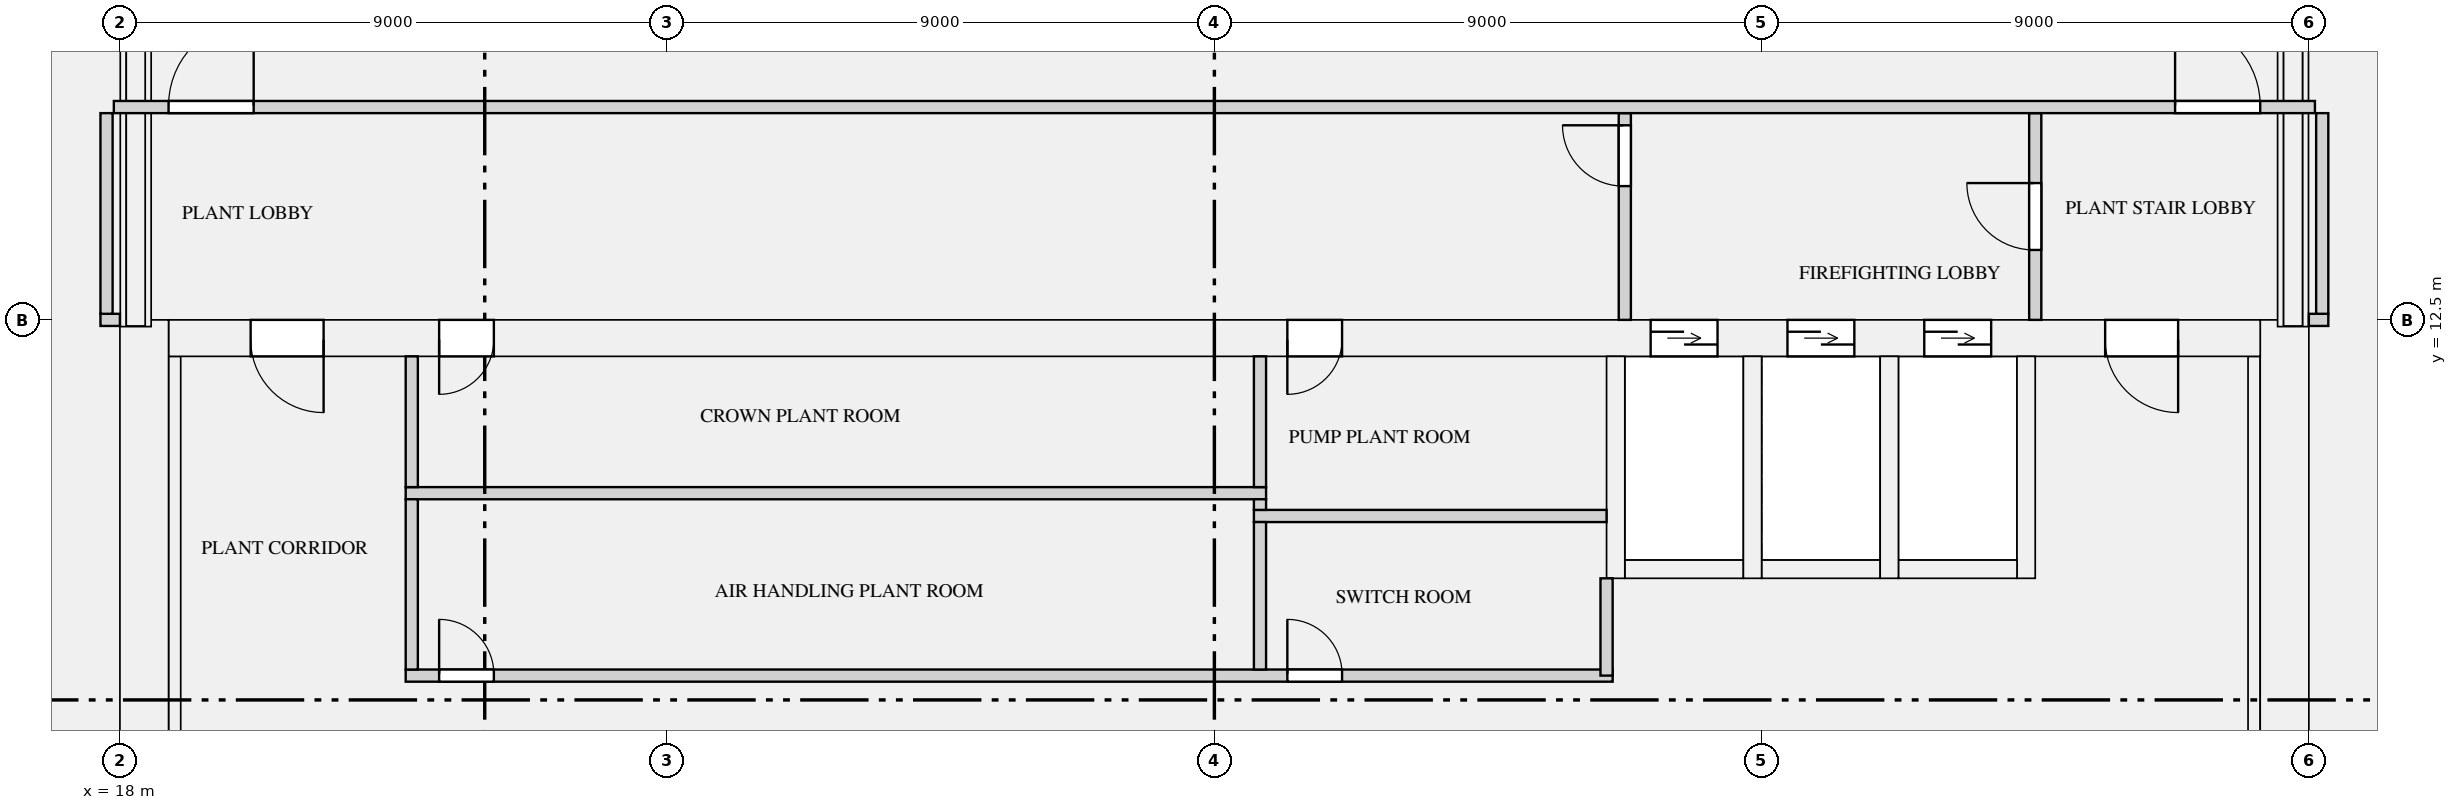
"""IFC4 building model, lengths in metres.
Left out: names, types, materials, properties, quantities, classifications, styles, units other than length and angle.
Written with IfcOpenShell. Run it as: python <this file> out.ifc"""

import sys

from ifc_helpers import new_model, si_unit, direction, frame, frame_2d, origin, place, context, subcontext, project, spatial, rectangle, extrude, element, fill, save


model = new_model("IFC4")
c1 = context("Model", 3, precision=1e-05, world=origin(), true_north=direction((0.0, 1.0)))
c2 = subcontext(c1, "Body", "Model", "MODEL_VIEW")
j1 = project(units=[si_unit("LENGTHUNIT", "METRE"), si_unit("PLANEANGLEUNIT", "RADIAN")], contexts=[c1])
p1 = place(None, origin())
s1 = spatial("IfcSite", under=j1, at=p1, CompositionType="ELEMENT")
p2 = place(p1, origin())
s2 = spatial("IfcBuilding", under=s1, at=p2, CompositionType="ELEMENT")
p3 = place(p2, frame((0.0, 0.0, 130.8)))
s3 = spatial("IfcBuildingStorey", under=s2, at=p3, CompositionType="ELEMENT", Elevation=130.8)
for number, where, z_axis, x_axis in (
    (1, (18.4, 0.0, 0.0), (0.0, 0.0, 1.0), (0.0, 1.0, 0.0)),
    (2, (53.6, 0.0, 0.0), (0.0, 0.0, 1.0), (0.0, 1.0, 0.0)),
):
    element("IfcWall", number, at=place(p3, frame(where, z_axis=z_axis, x_axis=x_axis)), inside=s3, PredefinedType="SHEAR", context=c2, shape_type="SweptSolid", body=[
        extrude(rectangle(XDim=12.5, YDim=0.8, at=frame_2d((6.25, 0.0))), origin(), (0.0, 0.0, 1.0), 6.3),
    ])
p4 = place(p3, frame((18.8, 12.2, 0.0), z_axis=(0.0, 0.0, 1.0), x_axis=(1.0, 0.0, 0.0)))
e3 = element("IfcWall", 3, at=p4, inside=s3, PredefinedType="SHEAR", context=c2, shape_type="SweptSolid", body=[
    extrude(rectangle(XDim=34.4, YDim=0.6, at=frame_2d((17.2, 0.0))), origin(), (0.0, 0.0, 1.0), 6.3),
])
p5 = place(p4, frame((24.375, 0.0, 0.0)))
e4 = element("IfcOpeningElement", 4, at=p5, cuts=e3, PredefinedType="OPENING", context=c2, shape_type="SweptSolid", body=[
    extrude(rectangle(XDim=1.1, YDim=2.1, at=frame_2d((0.55, 1.05))), frame((0.0, 0.31, 0.0), z_axis=(0.0, -1.0, 0.0), x_axis=(1.0, 0.0, 0.0)), (0.0, 0.0, 1.0), 0.62),
])
p6 = place(p4, frame((26.625, 0.0, 0.0)))
e5 = element("IfcOpeningElement", 5, at=p6, cuts=e3, PredefinedType="OPENING", context=c2, shape_type="SweptSolid", body=[
    extrude(rectangle(XDim=1.1, YDim=2.1, at=frame_2d((0.55, 1.05))), frame((0.0, 0.31, 0.0), z_axis=(0.0, -1.0, 0.0), x_axis=(1.0, 0.0, 0.0)), (0.0, 0.0, 1.0), 0.62),
])
p7 = place(p4, frame((28.875, 0.0, 0.0)))
e6 = element("IfcOpeningElement", 6, at=p7, cuts=e3, PredefinedType="OPENING", context=c2, shape_type="SweptSolid", body=[
    extrude(rectangle(XDim=1.1, YDim=2.1, at=frame_2d((0.55, 1.05))), frame((0.0, 0.31, 0.0), z_axis=(0.0, -1.0, 0.0), x_axis=(1.0, 0.0, 0.0)), (0.0, 0.0, 1.0), 0.62),
])
p8 = place(p4, frame((18.4, 0.0, 0.0)))
e7 = element("IfcOpeningElement", 7, at=p8, cuts=e3, PredefinedType="OPENING", context=c2, shape_type="SweptSolid", body=[
    extrude(rectangle(XDim=0.9, YDim=2.1, at=frame_2d((0.45, 1.05))), frame((0.0, 0.31, 0.0), z_axis=(0.0, -1.0, 0.0), x_axis=(1.0, 0.0, 0.0)), (0.0, 0.0, 1.0), 0.62),
])
p9 = place(p4, frame((4.45, 0.0, 0.0)))
e8 = element("IfcOpeningElement", 8, at=p9, cuts=e3, PredefinedType="OPENING", context=c2, shape_type="SweptSolid", body=[
    extrude(rectangle(XDim=0.9, YDim=2.1, at=frame_2d((0.45, 1.05))), frame((0.0, 0.31, 0.0), z_axis=(0.0, -1.0, 0.0), x_axis=(1.0, 0.0, 0.0)), (0.0, 0.0, 1.0), 0.62),
])
p10 = place(p4, frame((1.35, 0.0, 0.0)))
e9 = element("IfcOpeningElement", 9, at=p10, cuts=e3, PredefinedType="OPENING", context=c2, shape_type="SweptSolid", body=[
    extrude(rectangle(XDim=1.2, YDim=2.1, at=frame_2d((0.6, 1.05))), frame((0.0, 0.31, 0.0), z_axis=(0.0, -1.0, 0.0), x_axis=(1.0, 0.0, 0.0)), (0.0, 0.0, 1.0), 0.62),
])
p11 = place(p4, frame((31.85, 0.0, 0.0)))
e10 = element("IfcOpeningElement", 10, at=p11, cuts=e3, PredefinedType="OPENING", context=c2, shape_type="SweptSolid", body=[
    extrude(rectangle(XDim=1.2, YDim=2.1, at=frame_2d((0.6, 1.05))), frame((0.0, 0.31, 0.0), z_axis=(0.0, -1.0, 0.0), x_axis=(1.0, 0.0, 0.0)), (0.0, 0.0, 1.0), 0.62),
])
for number, where, z_axis, x_axis in (
    (11, (18.9, 1.0, 0.0), (0.0, 0.0, 1.0), (0.0, 1.0, 0.0)),
    (12, (53.1, 1.0, 0.0), (0.0, 0.0, 1.0), (0.0, 1.0, 0.0)),
):
    element("IfcWall", number, at=place(p3, frame(where, z_axis=z_axis, x_axis=x_axis)), inside=s3, PredefinedType="SHEAR", context=c2, shape_type="SweptSolid", body=[
        extrude(rectangle(XDim=10.9, YDim=0.2, at=frame_2d((5.45, 0.0))), origin(), (0.0, 0.0, 1.0), 6.3),
    ])
p12 = place(p3, frame((42.75, 8.4, 0.0), z_axis=(0.0, 0.0, 1.0), x_axis=(1.0, 0.0, 0.0)))
e13 = element("IfcWall", 13, at=p12, inside=s3, PredefinedType="SHEAR", context=c2, shape_type="SweptSolid", body=[
    extrude(rectangle(XDim=1.95, YDim=0.3, at=frame_2d((0.975, 0.0))), origin(), (0.0, 0.0, 1.0), 6.3),
])
p13 = place(p3, frame((42.6, 8.25, 0.0), z_axis=(0.0, 0.0, 1.0), x_axis=(0.0, 1.0, 0.0)))
e14 = element("IfcWall", 14, at=p13, inside=s3, PredefinedType="SHEAR", context=c2, shape_type="SweptSolid", body=[
    extrude(rectangle(XDim=3.65, YDim=0.3, at=frame_2d((1.825, 0.0))), origin(), (0.0, 0.0, 1.0), 6.3),
])
p14 = place(p3, frame((45.0, 8.4, 0.0), z_axis=(0.0, 0.0, 1.0), x_axis=(1.0, 0.0, 0.0)))
e15 = element("IfcWall", 15, at=p14, inside=s3, PredefinedType="SHEAR", context=c2, shape_type="SweptSolid", body=[
    extrude(rectangle(XDim=1.95, YDim=0.3, at=frame_2d((0.975, 0.0))), origin(), (0.0, 0.0, 1.0), 6.3),
])
p15 = place(p3, frame((44.85, 8.25, 0.0), z_axis=(0.0, 0.0, 1.0), x_axis=(0.0, 1.0, 0.0)))
e16 = element("IfcWall", 16, at=p15, inside=s3, PredefinedType="SHEAR", context=c2, shape_type="SweptSolid", body=[
    extrude(rectangle(XDim=3.65, YDim=0.3, at=frame_2d((1.825, 0.0))), origin(), (0.0, 0.0, 1.0), 6.3),
])
p16 = place(p3, frame((47.25, 8.4, 0.0), z_axis=(0.0, 0.0, 1.0), x_axis=(1.0, 0.0, 0.0)))
e17 = element("IfcWall", 17, at=p16, inside=s3, PredefinedType="SHEAR", context=c2, shape_type="SweptSolid", body=[
    extrude(rectangle(XDim=1.95, YDim=0.3, at=frame_2d((0.975, 0.0))), origin(), (0.0, 0.0, 1.0), 6.3),
])
for number, where, z_axis, x_axis in (
    (18, (47.1, 8.25, 0.0), (0.0, 0.0, 1.0), (0.0, 1.0, 0.0)),
    (19, (49.35, 8.25, 0.0), (0.0, 0.0, 1.0), (0.0, 1.0, 0.0)),
):
    element("IfcWall", number, at=place(p3, frame(where, z_axis=z_axis, x_axis=x_axis)), inside=s3, PredefinedType="SHEAR", context=c2, shape_type="SweptSolid", body=[
        extrude(rectangle(XDim=3.65, YDim=0.3, at=frame_2d((1.825, 0.0))), origin(), (0.0, 0.0, 1.0), 6.3),
    ])
p17 = place(p3, frame((22.7, 6.65, 0.0), z_axis=(0.0, 0.0, 1.0), x_axis=(1.0, 0.0, 0.0)))
e20 = element("IfcWall", 20, at=p17, inside=s3, PredefinedType="PARTITIONING", context=c2, shape_type="SweptSolid", body=[
    extrude(rectangle(XDim=19.85, YDim=0.2, at=frame_2d((9.925, 0.0))), origin(), (0.0, 0.0, 1.0), 5.8),
])
p18 = place(p17, frame((14.5, 0.0, 0.0)))
e21 = element("IfcOpeningElement", 21, at=p18, cuts=e20, PredefinedType="OPENING", context=c2, shape_type="SweptSolid", body=[
    extrude(rectangle(XDim=0.9, YDim=2.1, at=frame_2d((0.45, 1.05))), frame((0.0, 0.11, 0.0), z_axis=(0.0, -1.0, 0.0), x_axis=(1.0, 0.0, 0.0)), (0.0, 0.0, 1.0), 0.22),
])
p19 = place(p17, frame((0.55, 0.0, 0.0)))
e22 = element("IfcOpeningElement", 22, at=p19, cuts=e20, PredefinedType="OPENING", context=c2, shape_type="SweptSolid", body=[
    extrude(rectangle(XDim=0.9, YDim=2.1, at=frame_2d((0.45, 1.05))), frame((0.0, 0.11, 0.0), z_axis=(0.0, -1.0, 0.0), x_axis=(1.0, 0.0, 0.0)), (0.0, 0.0, 1.0), 0.22),
])
p20 = place(p3, frame((36.65, 9.275, 0.0), z_axis=(0.0, 0.0, 1.0), x_axis=(1.0, 0.0, 0.0)))
e23 = element("IfcWall", 23, at=p20, inside=s3, PredefinedType="PARTITIONING", context=c2, shape_type="SweptSolid", body=[
    extrude(rectangle(XDim=5.8, YDim=0.2, at=frame_2d((2.9, 0.0))), origin(), (0.0, 0.0, 1.0), 5.8),
])
p21 = place(p3, frame((22.7, 9.65, 0.0), z_axis=(0.0, 0.0, 1.0), x_axis=(1.0, 0.0, 0.0)))
e24 = element("IfcWall", 24, at=p21, inside=s3, PredefinedType="PARTITIONING", context=c2, shape_type="SweptSolid", body=[
    extrude(rectangle(XDim=14.15, YDim=0.2, at=frame_2d((7.075, 0.0))), origin(), (0.0, 0.0, 1.0), 5.8),
])
for number, where, z_axis, x_axis in (
    (25, (17.68, 12.5, 0.0), (0.0, 0.0, 1.0), (1.0, 0.0, 0.0)),
    (26, (54.0, 12.5, 0.0), (0.0, 0.0, 1.0), (1.0, 0.0, 0.0)),
):
    element("IfcWall", number, at=place(p3, frame(where, z_axis=z_axis, x_axis=x_axis)), inside=s3, PredefinedType="PARTITIONING", context=c2, shape_type="SweptSolid", body=[
        extrude(rectangle(XDim=0.32, YDim=0.2, at=frame_2d((0.16, 0.0))), origin(), (0.0, 0.0, 1.0), 5.8),
    ])
p22 = place(p3, frame((42.45, 6.65, 0.0), z_axis=(0.0, 0.0, 1.0), x_axis=(0.0, 1.0, 0.0)))
e27 = element("IfcWall", 27, at=p22, inside=s3, PredefinedType="PARTITIONING", context=c2, shape_type="SweptSolid", body=[
    extrude(rectangle(XDim=1.6, YDim=0.2, at=frame_2d((0.8, 0.0))), origin(), (0.0, 0.0, 1.0), 5.8),
])
p23 = place(p3, frame((22.8, 6.75, 0.0), z_axis=(0.0, 0.0, 1.0), x_axis=(0.0, 1.0, 0.0)))
e28 = element("IfcWall", 28, at=p23, inside=s3, PredefinedType="PARTITIONING", context=c2, shape_type="SweptSolid", body=[
    extrude(rectangle(XDim=2.8, YDim=0.2, at=frame_2d((1.4, 0.0))), origin(), (0.0, 0.0, 1.0), 5.8),
])
p24 = place(p3, frame((36.75, 6.75, 0.0), z_axis=(0.0, 0.0, 1.0), x_axis=(0.0, 1.0, 0.0)))
e29 = element("IfcWall", 29, at=p24, inside=s3, PredefinedType="PARTITIONING", context=c2, shape_type="SweptSolid", body=[
    extrude(rectangle(XDim=2.425, YDim=0.2, at=frame_2d((1.212, 0.0))), origin(), (0.0, 0.0, 1.0), 5.8),
])
p25 = place(p3, frame((36.75, 9.375, 0.0), z_axis=(0.0, 0.0, 1.0), x_axis=(0.0, 1.0, 0.0)))
e30 = element("IfcWall", 30, at=p25, inside=s3, PredefinedType="PARTITIONING", context=c2, shape_type="SweptSolid", body=[
    extrude(rectangle(XDim=0.175, YDim=0.2, at=frame_2d((0.087, 0.0))), origin(), (0.0, 0.0, 1.0), 5.8),
])
for number, where, z_axis, x_axis in (
    (31, (22.8, 9.75, 0.0), (0.0, 0.0, 1.0), (0.0, 1.0, 0.0)),
    (32, (36.75, 9.75, 0.0), (0.0, 0.0, 1.0), (0.0, 1.0, 0.0)),
):
    element("IfcWall", number, at=place(p3, frame(where, z_axis=z_axis, x_axis=x_axis)), inside=s3, PredefinedType="PARTITIONING", context=c2, shape_type="SweptSolid", body=[
        extrude(rectangle(XDim=2.15, YDim=0.2, at=frame_2d((1.075, 0.0))), origin(), (0.0, 0.0, 1.0), 5.8),
    ])
p26 = place(p3, frame((42.75, 12.5, 0.0), z_axis=(0.0, 0.0, 1.0), x_axis=(0.0, 1.0, 0.0)))
e33 = element("IfcWall", 33, at=p26, inside=s3, PredefinedType="PARTITIONING", context=c2, shape_type="SweptSolid", body=[
    extrude(rectangle(XDim=3.4, YDim=0.2, at=frame_2d((1.7, 0.0))), origin(), (0.0, 0.0, 1.0), 5.8),
])
p27 = place(p26, frame((2.2, 0.0, 0.0)))
e34 = element("IfcOpeningElement", 34, at=p27, cuts=e33, PredefinedType="OPENING", context=c2, shape_type="SweptSolid", body=[
    extrude(rectangle(XDim=1.0, YDim=2.1, at=frame_2d((0.5, 1.05))), frame((0.0, 0.11, 0.0), z_axis=(0.0, -1.0, 0.0), x_axis=(1.0, 0.0, 0.0)), (0.0, 0.0, 1.0), 0.22),
])
p28 = place(p3, frame((49.5, 12.5, 0.0), z_axis=(0.0, 0.0, 1.0), x_axis=(0.0, 1.0, 0.0)))
e35 = element("IfcWall", 35, at=p28, inside=s3, PredefinedType="PARTITIONING", context=c2, shape_type="SweptSolid", body=[
    extrude(rectangle(XDim=3.4, YDim=0.2, at=frame_2d((1.7, 0.0))), origin(), (0.0, 0.0, 1.0), 5.8),
])
p29 = place(p28, frame((1.15, 0.0, 0.0)))
e36 = element("IfcOpeningElement", 36, at=p29, cuts=e35, PredefinedType="OPENING", context=c2, shape_type="SweptSolid", body=[
    extrude(rectangle(XDim=1.1, YDim=2.1, at=frame_2d((0.55, 1.05))), frame((0.0, 0.11, 0.0), z_axis=(0.0, -1.0, 0.0), x_axis=(1.0, 0.0, 0.0)), (0.0, 0.0, 1.0), 0.22),
])
for number, where, z_axis, x_axis in (
    (37, (17.78, 12.6, 0.0), (0.0, 0.0, 1.0), (0.0, 1.0, 0.0)),
    (38, (54.22, 12.6, 0.0), (0.0, 0.0, 1.0), (0.0, 1.0, 0.0)),
):
    element("IfcWall", number, at=place(p3, frame(where, z_axis=z_axis, x_axis=x_axis)), inside=s3, PredefinedType="PARTITIONING", context=c2, shape_type="SweptSolid", body=[
        extrude(rectangle(XDim=3.3, YDim=0.2, at=frame_2d((1.65, 0.0))), origin(), (0.0, 0.0, 1.0), 5.8),
    ])
p30 = place(p3, frame((17.9, 16.0, 0.0), z_axis=(0.0, 0.0, 1.0), x_axis=(1.0, 0.0, 0.0)))
e39 = element("IfcWall", 39, at=p30, inside=s3, PredefinedType="PARTITIONING", context=c2, shape_type="SweptSolid", body=[
    extrude(rectangle(XDim=36.2, YDim=0.2, at=frame_2d((18.1, 0.0))), origin(), (0.0, 0.0, 1.0), 5.8),
])
p31 = place(p30, frame((0.9, 0.0, 0.0)))
e40 = element("IfcOpeningElement", 40, at=p31, cuts=e39, PredefinedType="OPENING", context=c2, shape_type="SweptSolid", body=[
    extrude(rectangle(XDim=1.4, YDim=2.1, at=frame_2d((0.7, 1.05))), frame((0.0, 0.11, 0.0), z_axis=(0.0, -1.0, 0.0), x_axis=(1.0, 0.0, 0.0)), (0.0, 0.0, 1.0), 0.22),
])
p32 = place(p30, frame((33.9, 0.0, 0.0)))
e41 = element("IfcOpeningElement", 41, at=p32, cuts=e39, PredefinedType="OPENING", context=c2, shape_type="SweptSolid", body=[
    extrude(rectangle(XDim=1.4, YDim=2.1, at=frame_2d((0.7, 1.05))), frame((0.0, 0.11, 0.0), z_axis=(0.0, -1.0, 0.0), x_axis=(1.0, 0.0, 0.0)), (0.0, 0.0, 1.0), 0.22),
])
p33 = place(p5, origin())
e42 = element("IfcDoor", 42, at=p33, inside=s3, OperationType="DOUBLE_DOOR_SLIDING", PredefinedType="DOOR", context=c2, shape_type="SweptSolid", body=[
    extrude(rectangle(XDim=1.1, YDim=2.1, at=frame_2d((0.55, 1.05))), frame((0.0, 0.025, 0.0), z_axis=(0.0, -1.0, 0.0), x_axis=(1.0, 0.0, 0.0)), (0.0, 0.0, 1.0), 0.05),
])
fill(e4, e42)
p34 = place(p6, origin())
e43 = element("IfcDoor", 43, at=p34, inside=s3, OperationType="DOUBLE_DOOR_SLIDING", PredefinedType="DOOR", context=c2, shape_type="SweptSolid", body=[
    extrude(rectangle(XDim=1.1, YDim=2.1, at=frame_2d((0.55, 1.05))), frame((0.0, 0.025, 0.0), z_axis=(0.0, -1.0, 0.0), x_axis=(1.0, 0.0, 0.0)), (0.0, 0.0, 1.0), 0.05),
])
fill(e5, e43)
p35 = place(p7, origin())
e44 = element("IfcDoor", 44, at=p35, inside=s3, OperationType="DOUBLE_DOOR_SLIDING", PredefinedType="DOOR", context=c2, shape_type="SweptSolid", body=[
    extrude(rectangle(XDim=1.1, YDim=2.1, at=frame_2d((0.55, 1.05))), frame((0.0, 0.025, 0.0), z_axis=(0.0, -1.0, 0.0), x_axis=(1.0, 0.0, 0.0)), (0.0, 0.0, 1.0), 0.05),
])
fill(e6, e44)
p36 = place(p18, origin())
e45 = element("IfcDoor", 45, at=p36, inside=s3, OperationType="SINGLE_SWING_LEFT", PredefinedType="DOOR", context=c2, shape_type="SweptSolid", body=[
    extrude(rectangle(XDim=0.9, YDim=2.1, at=frame_2d((0.45, 1.05))), frame((0.0, 0.025, 0.0), z_axis=(0.0, -1.0, 0.0), x_axis=(1.0, 0.0, 0.0)), (0.0, 0.0, 1.0), 0.05),
])
fill(e21, e45)
p37 = place(p8, frame((0.9, 0.0, 0.0), z_axis=(0.0, 0.0, 1.0), x_axis=(-1.0, 0.0, 0.0)))
e46 = element("IfcDoor", 46, at=p37, inside=s3, OperationType="SINGLE_SWING_RIGHT", PredefinedType="DOOR", context=c2, shape_type="SweptSolid", body=[
    extrude(rectangle(XDim=0.9, YDim=2.1, at=frame_2d((0.45, 1.05))), frame((0.0, 0.025, 0.0), z_axis=(0.0, -1.0, 0.0), x_axis=(1.0, 0.0, 0.0)), (0.0, 0.0, 1.0), 0.05),
])
fill(e7, e46)
p38 = place(p9, frame((0.9, 0.0, 0.0), z_axis=(0.0, 0.0, 1.0), x_axis=(-1.0, 0.0, 0.0)))
e47 = element("IfcDoor", 47, at=p38, inside=s3, OperationType="SINGLE_SWING_RIGHT", PredefinedType="DOOR", context=c2, shape_type="SweptSolid", body=[
    extrude(rectangle(XDim=0.9, YDim=2.1, at=frame_2d((0.45, 1.05))), frame((0.0, 0.025, 0.0), z_axis=(0.0, -1.0, 0.0), x_axis=(1.0, 0.0, 0.0)), (0.0, 0.0, 1.0), 0.05),
])
fill(e8, e47)
p39 = place(p19, origin())
e48 = element("IfcDoor", 48, at=p39, inside=s3, OperationType="SINGLE_SWING_LEFT", PredefinedType="DOOR", context=c2, shape_type="SweptSolid", body=[
    extrude(rectangle(XDim=0.9, YDim=2.1, at=frame_2d((0.45, 1.05))), frame((0.0, 0.025, 0.0), z_axis=(0.0, -1.0, 0.0), x_axis=(1.0, 0.0, 0.0)), (0.0, 0.0, 1.0), 0.05),
])
fill(e22, e48)
p40 = place(p10, frame((1.2, 0.0, 0.0), z_axis=(0.0, 0.0, 1.0), x_axis=(-1.0, 0.0, 0.0)))
e49 = element("IfcDoor", 49, at=p40, inside=s3, OperationType="SINGLE_SWING_LEFT", PredefinedType="DOOR", context=c2, shape_type="SweptSolid", body=[
    extrude(rectangle(XDim=1.2, YDim=2.1, at=frame_2d((0.6, 1.05))), frame((0.0, 0.025, 0.0), z_axis=(0.0, -1.0, 0.0), x_axis=(1.0, 0.0, 0.0)), (0.0, 0.0, 1.0), 0.05),
])
fill(e9, e49)
p41 = place(p11, frame((1.2, 0.0, 0.0), z_axis=(0.0, 0.0, 1.0), x_axis=(-1.0, 0.0, 0.0)))
e50 = element("IfcDoor", 50, at=p41, inside=s3, OperationType="SINGLE_SWING_LEFT", PredefinedType="DOOR", context=c2, shape_type="SweptSolid", body=[
    extrude(rectangle(XDim=1.2, YDim=2.1, at=frame_2d((0.6, 1.05))), frame((0.0, 0.025, 0.0), z_axis=(0.0, -1.0, 0.0), x_axis=(1.0, 0.0, 0.0)), (0.0, 0.0, 1.0), 0.05),
])
fill(e10, e50)
p42 = place(p27, origin())
e51 = element("IfcDoor", 51, at=p42, inside=s3, OperationType="SINGLE_SWING_RIGHT", PredefinedType="DOOR", context=c2, shape_type="SweptSolid", body=[
    extrude(rectangle(XDim=1.0, YDim=2.1, at=frame_2d((0.5, 1.05))), frame((0.0, 0.025, 0.0), z_axis=(0.0, -1.0, 0.0), x_axis=(1.0, 0.0, 0.0)), (0.0, 0.0, 1.0), 0.05),
])
fill(e34, e51)
p43 = place(p29, origin())
e52 = element("IfcDoor", 52, at=p43, inside=s3, OperationType="SINGLE_SWING_RIGHT", PredefinedType="DOOR", context=c2, shape_type="SweptSolid", body=[
    extrude(rectangle(XDim=1.1, YDim=2.1, at=frame_2d((0.55, 1.05))), frame((0.0, 0.025, 0.0), z_axis=(0.0, -1.0, 0.0), x_axis=(1.0, 0.0, 0.0)), (0.0, 0.0, 1.0), 0.05),
])
fill(e36, e52)
p44 = place(p31, origin())
e53 = element("IfcDoor", 53, at=p44, inside=s3, OperationType="SINGLE_SWING_RIGHT", PredefinedType="DOOR", context=c2, shape_type="SweptSolid", body=[
    extrude(rectangle(XDim=1.4, YDim=2.1, at=frame_2d((0.7, 1.05))), frame((0.0, 0.025, 0.0), z_axis=(0.0, -1.0, 0.0), x_axis=(1.0, 0.0, 0.0)), (0.0, 0.0, 1.0), 0.05),
])
fill(e40, e53)
p45 = place(p32, origin())
e54 = element("IfcDoor", 54, at=p45, inside=s3, OperationType="SINGLE_SWING_LEFT", PredefinedType="DOOR", context=c2, shape_type="SweptSolid", body=[
    extrude(rectangle(XDim=1.4, YDim=2.1, at=frame_2d((0.7, 1.05))), frame((0.0, 0.025, 0.0), z_axis=(0.0, -1.0, 0.0), x_axis=(1.0, 0.0, 0.0)), (0.0, 0.0, 1.0), 0.05),
])
fill(e41, e54)
save(model, sys.argv[1])
